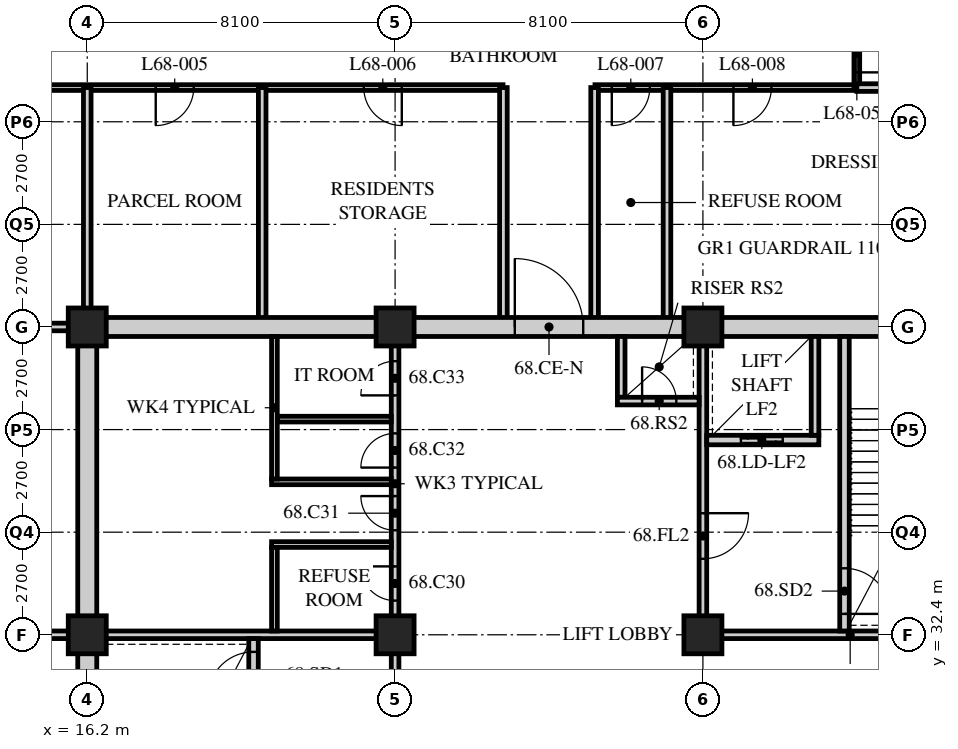
"""IFC4 building model, lengths in metres.
Left out: names, types, materials, properties, quantities, classifications, styles, units other than length and angle.
Written with IfcOpenShell. Run it as: python <this file> out.ifc"""

import sys

from ifc_helpers import new_model, si_unit, direction, frame, frame_2d, origin, origin_2d, place, context, subcontext, project, spatial, rectangle, hollow_rectangle, extrude, element, fill, save


model = new_model("IFC4")
c1 = context("Model", 3, precision=1e-05, world=origin(), true_north=direction((0.0, 1.0)))
c2 = subcontext(c1, "Body", "Model", "MODEL_VIEW")
j1 = project(units=[si_unit("LENGTHUNIT", "METRE"), si_unit("PLANEANGLEUNIT", "RADIAN")], contexts=[c1])
p1 = place(None, origin())
s1 = spatial("IfcSite", under=j1, at=p1, CompositionType="ELEMENT")
p2 = place(p1, origin())
s2 = spatial("IfcBuilding", under=s1, at=p2, CompositionType="ELEMENT")
p3 = place(p2, frame((0.0, 0.0, 265.8)))
s3 = spatial("IfcBuildingStorey", under=s2, at=p3, CompositionType="ELEMENT", Elevation=265.8)
for number, where, z_axis, x_axis in (
    (1, (16.2, 32.4, 0.0), (0.0, 0.0, 1.0), (1.0, 0.0, 0.0)),
    (2, (16.2, 40.5, 0.0), (0.0, 0.0, 1.0), (1.0, 0.0, 0.0)),
    (3, (24.3, 32.4, 0.0), (0.0, 0.0, 1.0), (1.0, 0.0, 0.0)),
    (4, (24.3, 40.5, 0.0), (0.0, 0.0, 1.0), (1.0, 0.0, 0.0)),
    (5, (32.4, 32.4, 0.0), (0.0, 0.0, 1.0), (1.0, 0.0, 0.0)),
    (6, (32.4, 40.5, 0.0), (0.0, 0.0, 1.0), (1.0, 0.0, 0.0)),
):
    element("IfcColumn", number, at=place(p3, frame(where, z_axis=z_axis, x_axis=x_axis)), inside=s3, PredefinedType="COLUMN", context=c2, shape_type="SweptSolid", body=[
        extrude(hollow_rectangle(XDim=1.0, YDim=1.0, WallThickness=0.1, at=origin_2d()), origin(), (0.0, 0.0, 1.0), 3.9),
    ])
p4 = place(p3, frame((9.9, 46.8, 0.0), z_axis=(0.0, 0.0, 1.0), x_axis=(1.0, 0.0, 0.0)))
e7 = element("IfcWall", 7, at=p4, inside=s3, PredefinedType="PARTITIONING", context=c2, shape_type="SweptSolid", body=[
    extrude(rectangle(XDim=17.24, YDim=0.15, at=frame_2d((8.62, 0.0))), origin(), (0.0, 0.0, 1.0), 3.69),
])
p5 = place(p4, frame((0.667, 0.0, 0.0)))
e8 = element("IfcOpeningElement", 8, at=p5, cuts=e7, PredefinedType="OPENING", context=c2, shape_type="SweptSolid", body=[
    extrude(rectangle(XDim=1.0, YDim=2.1, at=frame_2d((0.5, 1.05))), frame((0.0, 0.085, 0.0), z_axis=(0.0, -1.0, 0.0), x_axis=(1.0, 0.0, 0.0)), (0.0, 0.0, 1.0), 0.17),
])
p6 = place(p4, frame((3.817, 0.0, 0.0)))
e9 = element("IfcOpeningElement", 9, at=p6, cuts=e7, PredefinedType="OPENING", context=c2, shape_type="SweptSolid", body=[
    extrude(rectangle(XDim=1.0, YDim=2.1, at=frame_2d((0.5, 1.05))), frame((0.0, 0.085, 0.0), z_axis=(0.0, -1.0, 0.0), x_axis=(1.0, 0.0, 0.0)), (0.0, 0.0, 1.0), 0.17),
])
p7 = place(p4, frame((8.102, 0.0, 0.0)))
e10 = element("IfcOpeningElement", 10, at=p7, cuts=e7, PredefinedType="OPENING", context=c2, shape_type="SweptSolid", body=[
    extrude(rectangle(XDim=1.0, YDim=2.1, at=frame_2d((0.5, 1.05))), frame((0.0, 0.085, 0.0), z_axis=(0.0, -1.0, 0.0), x_axis=(1.0, 0.0, 0.0)), (0.0, 0.0, 1.0), 0.17),
])
p8 = place(p4, frame((13.577, 0.0, 0.0)))
e11 = element("IfcOpeningElement", 11, at=p8, cuts=e7, PredefinedType="OPENING", context=c2, shape_type="SweptSolid", body=[
    extrude(rectangle(XDim=1.0, YDim=2.1, at=frame_2d((0.5, 1.05))), frame((0.0, 0.085, 0.0), z_axis=(0.0, -1.0, 0.0), x_axis=(1.0, 0.0, 0.0)), (0.0, 0.0, 1.0), 0.17),
])
p9 = place(p3, frame((29.56, 46.8, 0.0), z_axis=(0.0, 0.0, 1.0), x_axis=(1.0, 0.0, 0.0)))
e12 = element("IfcWall", 12, at=p9, inside=s3, PredefinedType="PARTITIONING", context=c2, shape_type="SweptSolid", body=[
    extrude(rectangle(XDim=6.89, YDim=0.15, at=frame_2d((3.445, 0.0))), origin(), (0.0, 0.0, 1.0), 3.69),
])
p10 = place(p9, frame((0.442, 0.0, 0.0)))
e13 = element("IfcOpeningElement", 13, at=p10, cuts=e12, PredefinedType="OPENING", context=c2, shape_type="SweptSolid", body=[
    extrude(rectangle(XDim=1.0, YDim=2.1, at=frame_2d((0.5, 1.05))), frame((0.0, 0.085, 0.0), z_axis=(0.0, -1.0, 0.0), x_axis=(1.0, 0.0, 0.0)), (0.0, 0.0, 1.0), 0.17),
])
p11 = place(p9, frame((3.642, 0.0, 0.0)))
e14 = element("IfcOpeningElement", 14, at=p11, cuts=e12, PredefinedType="OPENING", context=c2, shape_type="SweptSolid", body=[
    extrude(rectangle(XDim=1.0, YDim=2.1, at=frame_2d((0.5, 1.05))), frame((0.0, 0.085, 0.0), z_axis=(0.0, -1.0, 0.0), x_axis=(1.0, 0.0, 0.0)), (0.0, 0.0, 1.0), 0.17),
])
for number, where, z_axis, x_axis in (
    (15, (9.9, 32.4, 0.0), (0.0, 0.0, 1.0), (1.0, 0.0, 0.0)),
    (16, (16.2, 40.5, 0.0), (0.0, 0.0, 1.0), (0.0, 1.0, 0.0)),
):
    element("IfcWall", number, at=place(p3, frame(where, z_axis=z_axis, x_axis=x_axis)), inside=s3, PredefinedType="SOLIDWALL", context=c2, shape_type="SweptSolid", body=[
        extrude(rectangle(XDim=6.3, YDim=0.2, at=frame_2d((3.15, 0.0))), origin(), (0.0, 0.0, 1.0), 3.078),
    ])
for number, where, z_axis, x_axis in (
    (17, (20.803, 46.8, 0.0), (0.0, 0.0, 1.0), (0.0, -1.0, 0.0)),
    (18, (31.455, 46.8, 0.0), (0.0, 0.0, 1.0), (0.0, -1.0, 0.0)),
    (19, (27.15, 40.5, 0.0), (0.0, 0.0, 1.0), (0.0, 1.0, 0.0)),
    (20, (29.55, 40.5, 0.0), (0.0, 0.0, 1.0), (0.0, 1.0, 0.0)),
):
    element("IfcWall", number, at=place(p3, frame(where, z_axis=z_axis, x_axis=x_axis)), inside=s3, PredefinedType="SOLIDWALL", context=c2, shape_type="SweptSolid", body=[
        extrude(rectangle(XDim=6.3, YDim=0.2, at=frame_2d((3.15, 0.0))), origin(), (0.0, 0.0, 1.0), 3.69),
    ])
p12 = place(p3, frame((36.45, 46.8, 0.0), z_axis=(0.0, 0.0, 1.0), x_axis=(0.0, 1.0, 0.0)))
e21 = element("IfcWall", 21, at=p12, inside=s3, PredefinedType="PARTITIONING", context=c2, shape_type="SweptSolid", body=[
    extrude(rectangle(XDim=1.8, YDim=0.15, at=frame_2d((0.9, 0.0))), origin(), (0.0, 0.0, 1.0), 3.69),
])
p13 = place(p12, frame((0.4, 0.0, 0.0)))
e22 = element("IfcOpeningElement", 22, at=p13, cuts=e21, PredefinedType="OPENING", context=c2, shape_type="SweptSolid", body=[
    extrude(rectangle(XDim=1.0, YDim=2.1, at=frame_2d((0.5, 1.05))), frame((0.0, 0.085, 0.0), z_axis=(0.0, -1.0, 0.0), x_axis=(1.0, 0.0, 0.0)), (0.0, 0.0, 1.0), 0.17),
])
p14 = place(p3, frame((9.9, 40.5, 0.0), z_axis=(0.0, 0.0, 1.0), x_axis=(1.0, 0.0, 0.0)))
e23 = element("IfcWall", 23, at=p14, inside=s3, PredefinedType="SOLIDWALL", context=c2, shape_type="SweptSolid", body=[
    extrude(rectangle(XDim=6.3, YDim=0.2, at=frame_2d((3.15, 0.0))), origin(), (0.0, 0.0, 1.0), 3.078),
])
p15 = place(p3, frame((36.45, 46.8, 0.0), z_axis=(0.0, 0.0, 1.0), x_axis=(1.0, 0.0, 0.0)))
e24 = element("IfcWall", 24, at=p15, inside=s3, PredefinedType="SOLIDWALL", context=c2, shape_type="SweptSolid", body=[
    extrude(rectangle(XDim=4.05, YDim=0.2, at=frame_2d((2.025, 0.0))), origin(), (0.0, 0.0, 1.0), 3.69),
])
p16 = place(p3, frame((15.95, 40.5, 0.0), z_axis=(0.0, 0.0, 1.0), x_axis=(1.0, 0.0, 0.0)))
e25 = element("IfcWall", 25, at=p16, inside=s3, PredefinedType="SOLIDWALL", context=c2, shape_type="SweptSolid", body=[
    extrude(rectangle(XDim=24.55, YDim=0.5, at=frame_2d((12.275, 0.0))), origin(), (0.0, 0.0, 1.0), 3.04),
])
p17 = place(p16, frame((11.5, 0.0, 0.0)))
e26 = element("IfcOpeningElement", 26, at=p17, cuts=e25, PredefinedType="OPENING", context=c2, shape_type="SweptSolid", body=[
    extrude(rectangle(XDim=1.8, YDim=2.4, at=frame_2d((0.9, 1.2))), frame((0.0, 0.26, 0.0), z_axis=(0.0, -1.0, 0.0), x_axis=(1.0, 0.0, 0.0)), (0.0, 0.0, 1.0), 0.52),
])
p18 = place(p3, frame((16.2, 24.55, 0.0), z_axis=(0.0, 0.0, 1.0), x_axis=(0.0, 1.0, 0.0)))
e27 = element("IfcWall", 27, at=p18, inside=s3, PredefinedType="SOLIDWALL", context=c2, shape_type="SweptSolid", body=[
    extrude(rectangle(XDim=15.7, YDim=0.5, at=frame_2d((7.85, 0.0))), origin(), (0.0, 0.0, 1.0), 3.078),
])
p19 = place(p3, frame((16.45, 32.4, 0.0), z_axis=(0.0, 0.0, 1.0), x_axis=(1.0, 0.0, 0.0)))
e28 = element("IfcWall", 28, at=p19, inside=s3, PredefinedType="SOLIDWALL", context=c2, shape_type="SweptSolid", body=[
    extrude(rectangle(XDim=7.95, YDim=0.2, at=frame_2d((3.975, 0.0))), origin(), (0.0, 0.0, 1.0), 3.078),
])
p20 = place(p3, frame((24.3, 24.55, 0.0), z_axis=(0.0, 0.0, 1.0), x_axis=(0.0, 1.0, 0.0)))
e29 = element("IfcWall", 29, at=p20, inside=s3, PredefinedType="SOLIDWALL", context=c2, shape_type="SweptSolid", body=[
    extrude(rectangle(XDim=7.75, YDim=0.2, at=frame_2d((3.875, 0.0))), origin(), (0.0, 0.0, 1.0), 3.078),
])
p21 = place(p20, frame((4.6, 0.0, 0.0)))
e30 = element("IfcOpeningElement", 30, at=p21, cuts=e29, PredefinedType="OPENING", context=c2, shape_type="SweptSolid", body=[
    extrude(rectangle(XDim=1.2, YDim=2.1, at=frame_2d((0.6, 1.05))), frame((0.0, 0.11, 0.0), z_axis=(0.0, -1.0, 0.0), x_axis=(1.0, 0.0, 0.0)), (0.0, 0.0, 1.0), 0.22),
])
p22 = place(p3, frame((20.575, 24.55, 0.0), z_axis=(0.0, 0.0, 1.0), x_axis=(0.0, 1.0, 0.0)))
e31 = element("IfcWall", 31, at=p22, inside=s3, PredefinedType="SOLIDWALL", context=c2, shape_type="SweptSolid", body=[
    extrude(rectangle(XDim=7.75, YDim=0.25, at=frame_2d((3.875, 0.0))), origin(), (0.0, 0.0, 1.0), 3.69),
])
p23 = place(p22, frame((6.2, 0.0, 0.0)))
e32 = element("IfcOpeningElement", 32, at=p23, cuts=e31, PredefinedType="OPENING", context=c2, shape_type="SweptSolid", body=[
    extrude(rectangle(XDim=1.2, YDim=2.1, at=frame_2d((0.6, 1.05))), frame((0.0, 0.135, 0.0), z_axis=(0.0, -1.0, 0.0), x_axis=(1.0, 0.0, 0.0)), (0.0, 0.0, 1.0), 0.27),
])
p24 = place(p3, frame((32.3, 32.4, 0.0), z_axis=(0.0, 0.0, 1.0), x_axis=(1.0, 0.0, 0.0)))
e33 = element("IfcWall", 33, at=p24, inside=s3, PredefinedType="SOLIDWALL", context=c2, shape_type="SweptSolid", body=[
    extrude(rectangle(XDim=7.95, YDim=0.2, at=frame_2d((3.975, 0.0))), origin(), (0.0, 0.0, 1.0), 3.078),
])
p25 = place(p3, frame((32.4, 32.5, 0.0), z_axis=(0.0, 0.0, 1.0), x_axis=(0.0, 1.0, 0.0)))
e34 = element("IfcWall", 34, at=p25, inside=s3, PredefinedType="SOLIDWALL", context=c2, shape_type="SweptSolid", body=[
    extrude(rectangle(XDim=7.75, YDim=0.2, at=frame_2d((3.875, 0.0))), origin(), (0.0, 0.0, 1.0), 3.078),
])
p26 = place(p25, frame((1.9, 0.0, 0.0)))
e35 = element("IfcOpeningElement", 35, at=p26, cuts=e34, PredefinedType="OPENING", context=c2, shape_type="SweptSolid", body=[
    extrude(rectangle(XDim=1.2, YDim=2.1, at=frame_2d((0.6, 1.05))), frame((0.0, 0.11, 0.0), z_axis=(0.0, -1.0, 0.0), x_axis=(1.0, 0.0, 0.0)), (0.0, 0.0, 1.0), 0.22),
])
p27 = place(p3, frame((36.125, 32.5, 0.0), z_axis=(0.0, 0.0, 1.0), x_axis=(0.0, 1.0, 0.0)))
e36 = element("IfcWall", 36, at=p27, inside=s3, PredefinedType="SOLIDWALL", context=c2, shape_type="SweptSolid", body=[
    extrude(rectangle(XDim=7.75, YDim=0.25, at=frame_2d((3.875, 0.0))), origin(), (0.0, 0.0, 1.0), 3.69),
])
p28 = place(p27, frame((0.45, 0.0, 0.0)))
e37 = element("IfcOpeningElement", 37, at=p28, cuts=e36, PredefinedType="OPENING", context=c2, shape_type="SweptSolid", body=[
    extrude(rectangle(XDim=1.2, YDim=2.1, at=frame_2d((0.6, 1.05))), frame((0.0, 0.135, 0.0), z_axis=(0.0, -1.0, 0.0), x_axis=(1.0, 0.0, 0.0)), (0.0, 0.0, 1.0), 0.27),
])
p29 = place(p3, frame((32.5, 37.525, 0.0), z_axis=(0.0, 0.0, 1.0), x_axis=(1.0, 0.0, 0.0)))
e38 = element("IfcWall", 38, at=p29, inside=s3, PredefinedType="SOLIDWALL", context=c2, shape_type="SweptSolid", body=[
    extrude(rectangle(XDim=2.95, YDim=0.25, at=frame_2d((1.475, 0.0))), origin(), (0.0, 0.0, 1.0), 3.69),
])
p30 = place(p29, frame((0.9, 0.0, 0.0)))
e39 = element("IfcOpeningElement", 39, at=p30, cuts=e38, PredefinedType="OPENING", context=c2, shape_type="SweptSolid", body=[
    extrude(rectangle(XDim=1.1, YDim=2.4, at=frame_2d((0.55, 1.2))), frame((0.0, 0.135, 0.0), z_axis=(0.0, -1.0, 0.0), x_axis=(1.0, 0.0, 0.0)), (0.0, 0.0, 1.0), 0.27),
])
p31 = place(p3, frame((35.35, 37.65, 0.0), z_axis=(0.0, 0.0, 1.0), x_axis=(0.0, 1.0, 0.0)))
e40 = element("IfcWall", 40, at=p31, inside=s3, PredefinedType="SOLIDWALL", context=c2, shape_type="SweptSolid", body=[
    extrude(rectangle(XDim=2.6, YDim=0.2, at=frame_2d((1.3, 0.0))), origin(), (0.0, 0.0, 1.0), 3.69),
])
p32 = place(p3, frame((30.25, 38.65, 0.0), z_axis=(0.0, 0.0, 1.0), x_axis=(0.0, 1.0, 0.0)))
e41 = element("IfcWall", 41, at=p32, inside=s3, PredefinedType="SOLIDWALL", context=c2, shape_type="SweptSolid", body=[
    extrude(rectangle(XDim=1.6, YDim=0.2, at=frame_2d((0.8, 0.0))), origin(), (0.0, 0.0, 1.0), 3.69),
])
p33 = place(p3, frame((30.15, 38.55, 0.0), z_axis=(0.0, 0.0, 1.0), x_axis=(1.0, 0.0, 0.0)))
e42 = element("IfcWall", 42, at=p33, inside=s3, PredefinedType="SOLIDWALL", context=c2, shape_type="SweptSolid", body=[
    extrude(rectangle(XDim=2.15, YDim=0.2, at=frame_2d((1.075, 0.0))), origin(), (0.0, 0.0, 1.0), 3.69),
])
p34 = place(p33, frame((0.65, 0.0, 0.0)))
e43 = element("IfcOpeningElement", 43, at=p34, cuts=e42, PredefinedType="OPENING", context=c2, shape_type="SweptSolid", body=[
    extrude(rectangle(XDim=0.9, YDim=2.1, at=frame_2d((0.45, 1.05))), frame((0.0, 0.11, 0.0), z_axis=(0.0, -1.0, 0.0), x_axis=(1.0, 0.0, 0.0)), (0.0, 0.0, 1.0), 0.22),
])
p35 = place(p3, frame((24.3, 32.5, 0.0), z_axis=(0.0, 0.0, 1.0), x_axis=(0.0, 1.0, 0.0)))
e44 = element("IfcWall", 44, at=p35, inside=s3, PredefinedType="PARTITIONING", context=c2, shape_type="SweptSolid", body=[
    extrude(rectangle(XDim=7.75, YDim=0.2, at=frame_2d((3.875, 0.0))), origin(), (0.0, 0.0, 1.0), 3.078),
])
p36 = place(p35, frame((0.8, 0.0, 0.0)))
e45 = element("IfcOpeningElement", 45, at=p36, cuts=e44, PredefinedType="OPENING", context=c2, shape_type="SweptSolid", body=[
    extrude(rectangle(XDim=0.9, YDim=2.1, at=frame_2d((0.45, 1.05))), frame((0.0, 0.11, 0.0), z_axis=(0.0, -1.0, 0.0), x_axis=(1.0, 0.0, 0.0)), (0.0, 0.0, 1.0), 0.22),
])
p37 = place(p35, frame((2.65, 0.0, 0.0)))
e46 = element("IfcOpeningElement", 46, at=p37, cuts=e44, PredefinedType="OPENING", context=c2, shape_type="SweptSolid", body=[
    extrude(rectangle(XDim=0.9, YDim=2.1, at=frame_2d((0.45, 1.05))), frame((0.0, 0.11, 0.0), z_axis=(0.0, -1.0, 0.0), x_axis=(1.0, 0.0, 0.0)), (0.0, 0.0, 1.0), 0.22),
])
p38 = place(p35, frame((4.3, 0.0, 0.0)))
e47 = element("IfcOpeningElement", 47, at=p38, cuts=e44, PredefinedType="OPENING", context=c2, shape_type="SweptSolid", body=[
    extrude(rectangle(XDim=0.9, YDim=2.1, at=frame_2d((0.45, 1.05))), frame((0.0, 0.11, 0.0), z_axis=(0.0, -1.0, 0.0), x_axis=(1.0, 0.0, 0.0)), (0.0, 0.0, 1.0), 0.22),
])
p39 = place(p35, frame((6.2, 0.0, 0.0)))
e48 = element("IfcOpeningElement", 48, at=p39, cuts=e44, PredefinedType="OPENING", context=c2, shape_type="SweptSolid", body=[
    extrude(rectangle(XDim=0.9, YDim=2.1, at=frame_2d((0.45, 1.05))), frame((0.0, 0.11, 0.0), z_axis=(0.0, -1.0, 0.0), x_axis=(1.0, 0.0, 0.0)), (0.0, 0.0, 1.0), 0.22),
])
for number, where, z_axis, x_axis in (
    (49, (21.05, 34.775, 0.0), (0.0, 0.0, 1.0), (1.0, 0.0, 0.0)),
    (50, (21.05, 36.425, 0.0), (0.0, 0.0, 1.0), (1.0, 0.0, 0.0)),
):
    element("IfcWall", number, at=place(p3, frame(where, z_axis=z_axis, x_axis=x_axis)), inside=s3, PredefinedType="PARTITIONING", context=c2, shape_type="SweptSolid", body=[
        extrude(rectangle(XDim=3.15, YDim=0.15, at=frame_2d((1.575, 0.0))), origin(), (0.0, 0.0, 1.0), 3.69),
    ])
p40 = place(p3, frame((21.2, 38.075, 0.0), z_axis=(0.0, 0.0, 1.0), x_axis=(1.0, 0.0, 0.0)))
e51 = element("IfcWall", 51, at=p40, inside=s3, PredefinedType="PARTITIONING", context=c2, shape_type="SweptSolid", body=[
    extrude(rectangle(XDim=3.0, YDim=0.15, at=frame_2d((1.5, 0.0))), origin(), (0.0, 0.0, 1.0), 3.69),
])
p41 = place(p3, frame((21.125, 32.5, 0.0), z_axis=(0.0, 0.0, 1.0), x_axis=(0.0, 1.0, 0.0)))
e52 = element("IfcWall", 52, at=p41, inside=s3, PredefinedType="PARTITIONING", context=c2, shape_type="SweptSolid", body=[
    extrude(rectangle(XDim=2.2, YDim=0.15, at=frame_2d((1.1, 0.0))), origin(), (0.0, 0.0, 1.0), 3.69),
])
p42 = place(p3, frame((21.125, 36.5, 0.0), z_axis=(0.0, 0.0, 1.0), x_axis=(0.0, 1.0, 0.0)))
e53 = element("IfcWall", 53, at=p42, inside=s3, PredefinedType="PARTITIONING", context=c2, shape_type="SweptSolid", body=[
    extrude(rectangle(XDim=3.75, YDim=0.15, at=frame_2d((1.875, 0.0))), origin(), (0.0, 0.0, 1.0), 3.69),
])
p43 = place(p7, origin())
e54 = element("IfcDoor", 54, at=p43, inside=s3, OperationType="SINGLE_SWING_RIGHT", PredefinedType="DOOR", context=c2, shape_type="SweptSolid", body=[
    extrude(rectangle(XDim=1.0, YDim=2.1, at=frame_2d((0.5, 1.05))), frame((0.0, 0.025, 0.0), z_axis=(0.0, -1.0, 0.0), x_axis=(1.0, 0.0, 0.0)), (0.0, 0.0, 1.0), 0.05),
])
fill(e10, e54)
p44 = place(p8, origin())
e55 = element("IfcDoor", 55, at=p44, inside=s3, OperationType="SINGLE_SWING_LEFT", PredefinedType="DOOR", context=c2, shape_type="SweptSolid", body=[
    extrude(rectangle(XDim=1.0, YDim=2.1, at=frame_2d((0.5, 1.05))), frame((0.0, 0.025, 0.0), z_axis=(0.0, -1.0, 0.0), x_axis=(1.0, 0.0, 0.0)), (0.0, 0.0, 1.0), 0.05),
])
fill(e11, e55)
p45 = place(p10, origin())
e56 = element("IfcDoor", 56, at=p45, inside=s3, OperationType="SINGLE_SWING_RIGHT", PredefinedType="DOOR", context=c2, shape_type="SweptSolid", body=[
    extrude(rectangle(XDim=1.0, YDim=2.1, at=frame_2d((0.5, 1.05))), frame((0.0, 0.025, 0.0), z_axis=(0.0, -1.0, 0.0), x_axis=(1.0, 0.0, 0.0)), (0.0, 0.0, 1.0), 0.05),
])
fill(e13, e56)
p46 = place(p11, origin())
e57 = element("IfcDoor", 57, at=p46, inside=s3, OperationType="SINGLE_SWING_RIGHT", PredefinedType="DOOR", context=c2, shape_type="SweptSolid", body=[
    extrude(rectangle(XDim=1.0, YDim=2.1, at=frame_2d((0.5, 1.05))), frame((0.0, 0.025, 0.0), z_axis=(0.0, -1.0, 0.0), x_axis=(1.0, 0.0, 0.0)), (0.0, 0.0, 1.0), 0.05),
])
fill(e14, e57)
p47 = place(p13, origin())
e58 = element("IfcDoor", 58, at=p47, inside=s3, OperationType="SINGLE_SWING_RIGHT", PredefinedType="DOOR", context=c2, shape_type="SweptSolid", body=[
    extrude(rectangle(XDim=1.0, YDim=2.1, at=frame_2d((0.5, 1.05))), frame((0.0, 0.025, 0.0), z_axis=(0.0, -1.0, 0.0), x_axis=(1.0, 0.0, 0.0)), (0.0, 0.0, 1.0), 0.05),
])
fill(e22, e58)
p48 = place(p36, origin())
e59 = element("IfcDoor", 59, at=p48, inside=s3, OperationType="SINGLE_SWING_RIGHT", PredefinedType="DOOR", context=c2, shape_type="SweptSolid", body=[
    extrude(rectangle(XDim=0.9, YDim=2.1, at=frame_2d((0.45, 1.05))), frame((0.0, 0.025, 0.0), z_axis=(0.0, -1.0, 0.0), x_axis=(1.0, 0.0, 0.0)), (0.0, 0.0, 1.0), 0.05),
])
fill(e45, e59)
p49 = place(p37, origin())
e60 = element("IfcDoor", 60, at=p49, inside=s3, OperationType="SINGLE_SWING_RIGHT", PredefinedType="DOOR", context=c2, shape_type="SweptSolid", body=[
    extrude(rectangle(XDim=0.9, YDim=2.1, at=frame_2d((0.45, 1.05))), frame((0.0, 0.025, 0.0), z_axis=(0.0, -1.0, 0.0), x_axis=(1.0, 0.0, 0.0)), (0.0, 0.0, 1.0), 0.05),
])
fill(e46, e60)
p50 = place(p38, origin())
e61 = element("IfcDoor", 61, at=p50, inside=s3, OperationType="SINGLE_SWING_LEFT", PredefinedType="DOOR", context=c2, shape_type="SweptSolid", body=[
    extrude(rectangle(XDim=0.9, YDim=2.1, at=frame_2d((0.45, 1.05))), frame((0.0, 0.025, 0.0), z_axis=(0.0, -1.0, 0.0), x_axis=(1.0, 0.0, 0.0)), (0.0, 0.0, 1.0), 0.05),
])
fill(e47, e61)
p51 = place(p39, origin())
e62 = element("IfcDoor", 62, at=p51, inside=s3, OperationType="SINGLE_SWING_LEFT", PredefinedType="DOOR", context=c2, shape_type="SweptSolid", body=[
    extrude(rectangle(XDim=0.9, YDim=2.1, at=frame_2d((0.45, 1.05))), frame((0.0, 0.025, 0.0), z_axis=(0.0, -1.0, 0.0), x_axis=(1.0, 0.0, 0.0)), (0.0, 0.0, 1.0), 0.05),
])
fill(e48, e62)
p52 = place(p23, origin())
e63 = element("IfcDoor", 63, at=p52, inside=s3, OperationType="SINGLE_SWING_LEFT", PredefinedType="DOOR", context=c2, shape_type="SweptSolid", body=[
    extrude(rectangle(XDim=1.2, YDim=2.1, at=frame_2d((0.6, 1.05))), frame((0.0, 0.025, 0.0), z_axis=(0.0, -1.0, 0.0), x_axis=(1.0, 0.0, 0.0)), (0.0, 0.0, 1.0), 0.05),
])
fill(e32, e63)
p53 = place(p28, origin())
e64 = element("IfcDoor", 64, at=p53, inside=s3, OperationType="SINGLE_SWING_RIGHT", PredefinedType="DOOR", context=c2, shape_type="SweptSolid", body=[
    extrude(rectangle(XDim=1.2, YDim=2.1, at=frame_2d((0.6, 1.05))), frame((0.0, 0.025, 0.0), z_axis=(0.0, -1.0, 0.0), x_axis=(1.0, 0.0, 0.0)), (0.0, 0.0, 1.0), 0.05),
])
fill(e37, e64)
p54 = place(p26, origin())
e65 = element("IfcDoor", 65, at=p54, inside=s3, OperationType="SINGLE_SWING_LEFT", PredefinedType="DOOR", context=c2, shape_type="SweptSolid", body=[
    extrude(rectangle(XDim=1.2, YDim=2.1, at=frame_2d((0.6, 1.05))), frame((0.0, 0.025, 0.0), z_axis=(0.0, -1.0, 0.0), x_axis=(1.0, 0.0, 0.0)), (0.0, 0.0, 1.0), 0.05),
])
fill(e35, e65)
p55 = place(p34, origin())
e66 = element("IfcDoor", 66, at=p55, inside=s3, OperationType="SINGLE_SWING_LEFT", PredefinedType="DOOR", context=c2, shape_type="SweptSolid", body=[
    extrude(rectangle(XDim=0.9, YDim=2.1, at=frame_2d((0.45, 1.05))), frame((0.0, 0.025, 0.0), z_axis=(0.0, -1.0, 0.0), x_axis=(1.0, 0.0, 0.0)), (0.0, 0.0, 1.0), 0.05),
])
fill(e43, e66)
p56 = place(p30, origin())
e67 = element("IfcDoor", 67, at=p56, inside=s3, OperationType="DOUBLE_DOOR_SLIDING", PredefinedType="DOOR", context=c2, shape_type="SweptSolid", body=[
    extrude(rectangle(XDim=1.1, YDim=2.4, at=frame_2d((0.55, 1.2))), frame((0.0, 0.025, 0.0), z_axis=(0.0, -1.0, 0.0), x_axis=(1.0, 0.0, 0.0)), (0.0, 0.0, 1.0), 0.05),
])
fill(e39, e67)
p57 = place(p17, origin())
e68 = element("IfcDoor", 68, at=p57, inside=s3, OperationType="DOUBLE_DOOR_SINGLE_SWING", PredefinedType="DOOR", context=c2, shape_type="SweptSolid", body=[
    extrude(rectangle(XDim=1.8, YDim=2.4, at=frame_2d((0.9, 1.2))), frame((0.0, 0.025, 0.0), z_axis=(0.0, -1.0, 0.0), x_axis=(1.0, 0.0, 0.0)), (0.0, 0.0, 1.0), 0.05),
])
fill(e26, e68)
save(model, sys.argv[1])
